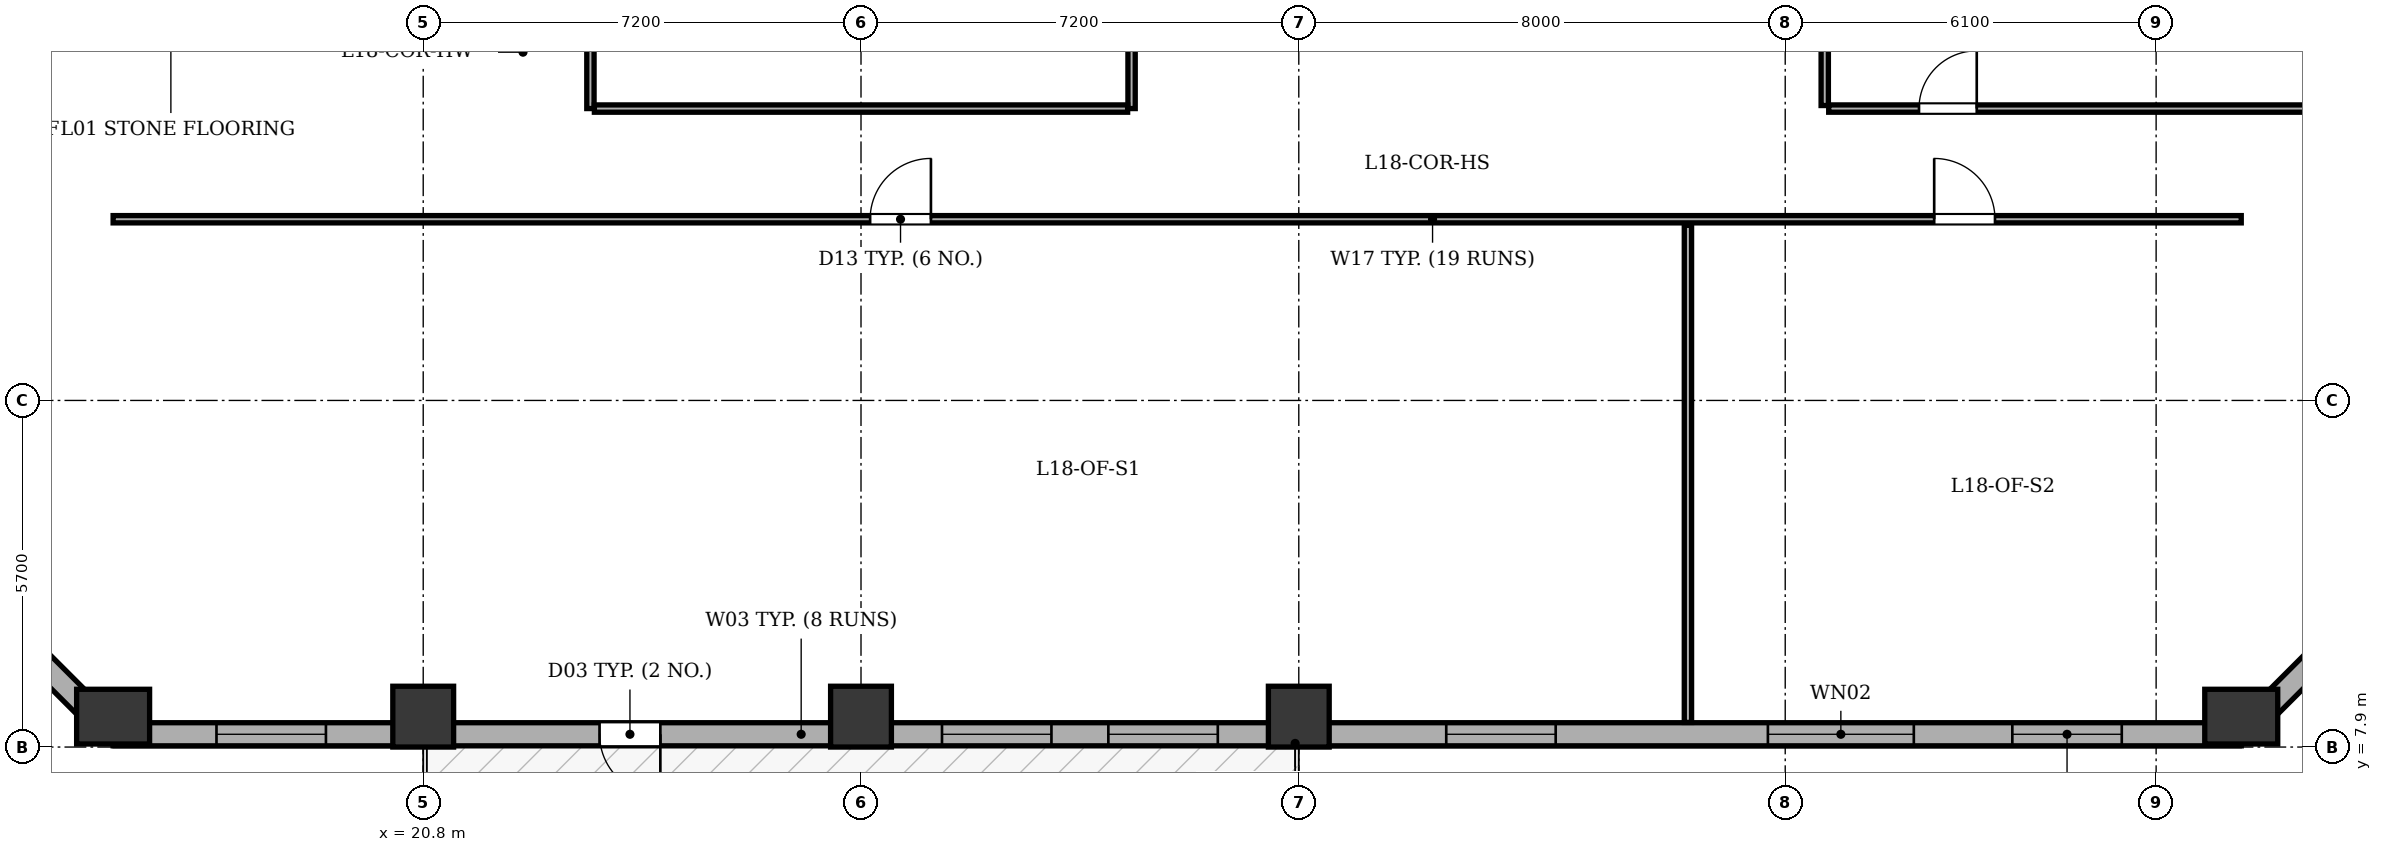
"""IFC4 building model, lengths in metres.
Left out: names, types, materials, properties, quantities, classifications, styles, units other than length and angle.
Written with IfcOpenShell. Run it as: python <this file> out.ifc"""

import sys

from ifc_helpers import new_model, si_unit, direction, frame, frame_2d, origin, origin_2d, place, context, subcontext, project, spatial, rectangle, extrude, element, fill, save


model = new_model("IFC4")
c1 = context("Model", 3, precision=1e-05, world=origin(), true_north=direction((0.0, 1.0)))
c2 = subcontext(c1, "Body", "Model", "MODEL_VIEW")
j1 = project(units=[si_unit("LENGTHUNIT", "METRE"), si_unit("PLANEANGLEUNIT", "RADIAN")], contexts=[c1])
p1 = place(None, origin())
s1 = spatial("IfcSite", under=j1, at=p1, CompositionType="ELEMENT")
p2 = place(p1, origin())
s2 = spatial("IfcBuilding", under=s1, at=p2, CompositionType="ELEMENT")
p3 = place(p2, frame((0.0, 0.0, 75.0)))
s3 = spatial("IfcBuildingStorey", under=s2, at=p3, CompositionType="ELEMENT", Elevation=75.0)
p4 = place(p3, frame((15.7, 8.4, 0.0), z_axis=(0.0, 0.0, 1.0), x_axis=(1.0, 0.0, 0.0)))
e1 = element("IfcColumn", 1, at=p4, inside=s3, PredefinedType="COLUMN", context=c2, shape_type="SweptSolid", body=[
    extrude(rectangle(XDim=0.9, YDim=1.2, at=origin_2d()), origin(), (0.0, 0.0, 1.0), 3.9),
])
for number, where, z_axis, x_axis in (
    (2, (20.8, 8.4, 0.0), (0.0, 0.0, 1.0), (1.0, 0.0, 0.0)),
    (3, (28.0, 8.4, 0.0), (0.0, 0.0, 1.0), (1.0, 0.0, 0.0)),
    (4, (35.2, 8.4, 0.0), (0.0, 0.0, 1.0), (1.0, 0.0, 0.0)),
):
    element("IfcColumn", number, at=place(p3, frame(where, z_axis=z_axis, x_axis=x_axis)), inside=s3, PredefinedType="COLUMN", context=c2, shape_type="SweptSolid", body=[
        extrude(rectangle(XDim=1.0, YDim=1.0, at=origin_2d()), origin(), (0.0, 0.0, 1.0), 3.9),
    ])
p5 = place(p3, frame((50.7, 8.4, 0.0), z_axis=(0.0, 0.0, 1.0), x_axis=(1.0, 0.0, 0.0)))
e5 = element("IfcColumn", 5, at=p5, inside=s3, PredefinedType="COLUMN", context=c2, shape_type="SweptSolid", body=[
    extrude(rectangle(XDim=0.9, YDim=1.2, at=origin_2d()), origin(), (0.0, 0.0, 1.0), 3.9),
])
p6 = place(p3, frame((50.7, 8.11, 0.0), z_axis=(0.0, 0.0, 1.0), x_axis=(-1.0, 0.0, 0.0)))
e6 = element("IfcWall", 6, at=p6, inside=s3, PredefinedType="STANDARD", context=c2, shape_type="SweptSolid", body=[
    extrude(rectangle(XDim=35.0, YDim=0.38, at=frame_2d((17.5, 0.0))), origin(), (0.0, 0.0, 1.0), 3.135),
])
p7 = place(p6, frame((26.0, 0.0, 0.0)))
e7 = element("IfcOpeningElement", 7, at=p7, cuts=e6, PredefinedType="OPENING", context=c2, shape_type="SweptSolid", body=[
    extrude(rectangle(XDim=1.0, YDim=2.02, at=frame_2d((0.5, 1.01))), frame((0.0, 0.2, 0.0), z_axis=(0.0, -1.0, 0.0), x_axis=(1.0, 0.0, 0.0)), (0.0, 0.0, 1.0), 0.4),
])
p8 = place(p6, frame((1.965, 0.0, 0.8)))
e8 = element("IfcOpeningElement", 8, at=p8, cuts=e6, PredefinedType="OPENING", context=c2, shape_type="SweptSolid", body=[
    extrude(rectangle(XDim=1.8, YDim=1.9, at=frame_2d((0.9, 0.95))), frame((0.0, 0.2, 0.0), z_axis=(0.0, -1.0, 0.0), x_axis=(1.0, 0.0, 0.0)), (0.0, 0.0, 1.0), 0.4),
])
p9 = place(p6, frame((5.385, 0.0, 0.8)))
e9 = element("IfcOpeningElement", 9, at=p9, cuts=e6, PredefinedType="OPENING", context=c2, shape_type="SweptSolid", body=[
    extrude(rectangle(XDim=2.4, YDim=1.9, at=frame_2d((1.2, 0.95))), frame((0.0, 0.2, 0.0), z_axis=(0.0, -1.0, 0.0), x_axis=(1.0, 0.0, 0.0)), (0.0, 0.0, 1.0), 0.4),
])
p10 = place(p6, frame((11.275, 0.0, 0.8)))
e10 = element("IfcOpeningElement", 10, at=p10, cuts=e6, PredefinedType="OPENING", context=c2, shape_type="SweptSolid", body=[
    extrude(rectangle(XDim=1.8, YDim=1.9, at=frame_2d((0.9, 0.95))), frame((0.0, 0.2, 0.0), z_axis=(0.0, -1.0, 0.0), x_axis=(1.0, 0.0, 0.0)), (0.0, 0.0, 1.0), 0.4),
])
p11 = place(p6, frame((16.832, 0.0, 0.8)))
e11 = element("IfcOpeningElement", 11, at=p11, cuts=e6, PredefinedType="OPENING", context=c2, shape_type="SweptSolid", body=[
    extrude(rectangle(XDim=1.8, YDim=1.9, at=frame_2d((0.9, 0.95))), frame((0.0, 0.2, 0.0), z_axis=(0.0, -1.0, 0.0), x_axis=(1.0, 0.0, 0.0)), (0.0, 0.0, 1.0), 0.4),
])
p12 = place(p6, frame((19.568, 0.0, 0.8)))
e12 = element("IfcOpeningElement", 12, at=p12, cuts=e6, PredefinedType="OPENING", context=c2, shape_type="SweptSolid", body=[
    extrude(rectangle(XDim=1.8, YDim=1.9, at=frame_2d((0.9, 0.95))), frame((0.0, 0.2, 0.0), z_axis=(0.0, -1.0, 0.0), x_axis=(1.0, 0.0, 0.0)), (0.0, 0.0, 1.0), 0.4),
])
p13 = place(p6, frame((31.5, 0.0, 0.8)))
e13 = element("IfcOpeningElement", 13, at=p13, cuts=e6, PredefinedType="OPENING", context=c2, shape_type="SweptSolid", body=[
    extrude(rectangle(XDim=1.8, YDim=1.9, at=frame_2d((0.9, 0.95))), frame((0.0, 0.2, 0.0), z_axis=(0.0, -1.0, 0.0), x_axis=(1.0, 0.0, 0.0)), (0.0, 0.0, 1.0), 0.4),
])
p14 = place(p3, frame((15.7, 8.11, 0.0), z_axis=(0.0, 0.0, 1.0), x_axis=(-0.707124801467, 0.707088760447, 0.0)))
e14 = element("IfcWall", 14, at=p14, inside=s3, PredefinedType="STANDARD", context=c2, shape_type="SweptSolid", body=[
    extrude(rectangle(XDim=6.774, YDim=0.38, at=frame_2d((3.387, 0.0))), origin(), (0.0, 0.0, 1.0), 3.135),
])
p15 = place(p14, frame((2.687, 0.0, 0.8)))
e15 = element("IfcOpeningElement", 15, at=p15, cuts=e14, PredefinedType="OPENING", context=c2, shape_type="SweptSolid", body=[
    extrude(rectangle(XDim=1.4, YDim=1.65, at=frame_2d((0.7, 0.825))), frame((0.0, 0.2, 0.0), z_axis=(0.0, -1.0, 0.0), x_axis=(1.0, 0.0, 0.0)), (0.0, 0.0, 1.0), 0.4),
])
p16 = place(p3, frame((55.49, 12.9, 0.0), z_axis=(0.0, 0.0, 1.0), x_axis=(-0.707124801467, -0.707088760447, 0.0)))
e16 = element("IfcWall", 16, at=p16, inside=s3, PredefinedType="STANDARD", context=c2, shape_type="SweptSolid", body=[
    extrude(rectangle(XDim=6.774, YDim=0.38, at=frame_2d((3.387, 0.0))), origin(), (0.0, 0.0, 1.0), 3.135),
])
p17 = place(p16, frame((2.687, 0.0, 0.8)))
e17 = element("IfcOpeningElement", 17, at=p17, cuts=e16, PredefinedType="OPENING", context=c2, shape_type="SweptSolid", body=[
    extrude(rectangle(XDim=1.4, YDim=1.65, at=frame_2d((0.7, 0.825))), frame((0.0, 0.2, 0.0), z_axis=(0.0, -1.0, 0.0), x_axis=(1.0, 0.0, 0.0)), (0.0, 0.0, 1.0), 0.4),
])
for number, where, z_axis, x_axis in (
    (18, (23.55, 18.4, 0.0), (0.0, 0.0, 1.0), (0.0, 1.0, 0.0)),
    (19, (32.45, 18.4, 0.0), (0.0, 0.0, 1.0), (0.0, 1.0, 0.0)),
):
    element("IfcWall", number, at=place(p3, frame(where, z_axis=z_axis, x_axis=x_axis)), inside=s3, PredefinedType="PARTITIONING", context=c2, shape_type="SweptSolid", body=[
        extrude(rectangle(XDim=3.485, YDim=0.12, at=frame_2d((1.743, 0.0))), origin(), (0.0, 0.0, 1.0), 3.6),
    ])
p18 = place(p3, frame((23.615, 18.4, 0.0), z_axis=(0.0, 0.0, 1.0), x_axis=(1.0, 0.0, 0.0)))
e20 = element("IfcWall", 20, at=p18, inside=s3, PredefinedType="PARTITIONING", context=c2, shape_type="SweptSolid", body=[
    extrude(rectangle(XDim=8.77, YDim=0.12, at=frame_2d((4.385, 0.0))), origin(), (0.0, 0.0, 1.0), 3.6),
])
p19 = place(p3, frame((15.7, 16.58, 0.0), z_axis=(0.0, 0.0, 1.0), x_axis=(1.0, 0.0, 0.0)))
e21 = element("IfcWall", 21, at=p19, inside=s3, PredefinedType="PARTITIONING", context=c2, shape_type="SweptSolid", body=[
    extrude(rectangle(XDim=35.0, YDim=0.12, at=frame_2d((17.5, 0.0))), origin(), (0.0, 0.0, 1.0), 3.6),
])
p20 = place(p19, frame((12.45, 0.0, 0.0)))
e22 = element("IfcOpeningElement", 22, at=p20, cuts=e21, PredefinedType="OPENING", context=c2, shape_type="SweptSolid", body=[
    extrude(rectangle(XDim=1.0, YDim=2.1, at=frame_2d((0.5, 1.05))), frame((0.0, 0.07, 0.0), z_axis=(0.0, -1.0, 0.0), x_axis=(1.0, 0.0, 0.0)), (0.0, 0.0, 1.0), 0.14),
])
p21 = place(p19, frame((29.95, 0.0, 0.0)))
e23 = element("IfcOpeningElement", 23, at=p21, cuts=e21, PredefinedType="OPENING", context=c2, shape_type="SweptSolid", body=[
    extrude(rectangle(XDim=1.0, YDim=2.1, at=frame_2d((0.5, 1.05))), frame((0.0, 0.07, 0.0), z_axis=(0.0, -1.0, 0.0), x_axis=(1.0, 0.0, 0.0)), (0.0, 0.0, 1.0), 0.14),
])
p22 = place(p3, frame((41.6, 8.305, 0.0), z_axis=(0.0, 0.0, 1.0), x_axis=(0.0, 1.0, 0.0)))
e24 = element("IfcWall", 24, at=p22, inside=s3, PredefinedType="PARTITIONING", context=c2, shape_type="SweptSolid", body=[
    extrude(rectangle(XDim=8.175, YDim=0.12, at=frame_2d((4.087, 0.0))), origin(), (0.0, 0.0, 1.0), 3.6),
])
p23 = place(p3, frame((43.85, 18.45, 0.0), z_axis=(0.0, 0.0, 1.0), x_axis=(0.0, 1.0, 0.0)))
e25 = element("IfcWall", 25, at=p23, inside=s3, PredefinedType="PARTITIONING", context=c2, shape_type="SweptSolid", body=[
    extrude(rectangle(XDim=17.5, YDim=0.12, at=frame_2d((8.75, 0.0))), origin(), (0.0, 0.0, 1.0), 3.6),
])
p24 = place(p3, frame((43.915, 18.4, 0.0), z_axis=(0.0, 0.0, 1.0), x_axis=(1.0, 0.0, 0.0)))
e26 = element("IfcWall", 26, at=p24, inside=s3, PredefinedType="PARTITIONING", context=c2, shape_type="SweptSolid", body=[
    extrude(rectangle(XDim=11.38, YDim=0.12, at=frame_2d((5.69, 0.0))), origin(), (0.0, 0.0, 1.0), 3.6),
])
p25 = place(p24, frame((1.485, 0.0, 0.0)))
e27 = element("IfcOpeningElement", 27, at=p25, cuts=e26, PredefinedType="OPENING", context=c2, shape_type="SweptSolid", body=[
    extrude(rectangle(XDim=0.95, YDim=2.1, at=frame_2d((0.475, 1.05))), frame((0.0, 0.07, 0.0), z_axis=(0.0, -1.0, 0.0), x_axis=(1.0, 0.0, 0.0)), (0.0, 0.0, 1.0), 0.14),
])
p26 = place(p7, origin())
e28 = element("IfcDoor", 28, at=p26, inside=s3, OperationType="SINGLE_SWING_LEFT", PredefinedType="DOOR", context=c2, shape_type="SweptSolid", body=[
    extrude(rectangle(XDim=1.0, YDim=2.02, at=frame_2d((0.5, 1.01))), frame((0.0, 0.025, 0.0), z_axis=(0.0, -1.0, 0.0), x_axis=(1.0, 0.0, 0.0)), (0.0, 0.0, 1.0), 0.05),
])
fill(e7, e28)
p27 = place(p8, origin())
e29 = element("IfcWindow", 29, at=p27, inside=s3, PartitioningType="SINGLE_PANEL", PredefinedType="WINDOW", context=c2, shape_type="SweptSolid", body=[
    extrude(rectangle(XDim=1.8, YDim=1.9, at=frame_2d((0.9, 0.95))), frame((0.0, -0.01, 0.0), z_axis=(0.0, -1.0, 0.0), x_axis=(1.0, 0.0, 0.0)), (0.0, 0.0, 1.0), 0.06),
])
fill(e8, e29)
p28 = place(p9, origin())
e30 = element("IfcWindow", 30, at=p28, inside=s3, PartitioningType="SINGLE_PANEL", PredefinedType="WINDOW", context=c2, shape_type="SweptSolid", body=[
    extrude(rectangle(XDim=2.4, YDim=1.9, at=frame_2d((1.2, 0.95))), frame((0.0, -0.01, 0.0), z_axis=(0.0, -1.0, 0.0), x_axis=(1.0, 0.0, 0.0)), (0.0, 0.0, 1.0), 0.06),
])
fill(e9, e30)
p29 = place(p10, origin())
e31 = element("IfcWindow", 31, at=p29, inside=s3, PartitioningType="SINGLE_PANEL", PredefinedType="WINDOW", context=c2, shape_type="SweptSolid", body=[
    extrude(rectangle(XDim=1.8, YDim=1.9, at=frame_2d((0.9, 0.95))), frame((0.0, -0.01, 0.0), z_axis=(0.0, -1.0, 0.0), x_axis=(1.0, 0.0, 0.0)), (0.0, 0.0, 1.0), 0.06),
])
fill(e10, e31)
p30 = place(p11, origin())
e32 = element("IfcWindow", 32, at=p30, inside=s3, PartitioningType="SINGLE_PANEL", PredefinedType="WINDOW", context=c2, shape_type="SweptSolid", body=[
    extrude(rectangle(XDim=1.8, YDim=1.9, at=frame_2d((0.9, 0.95))), frame((0.0, -0.01, 0.0), z_axis=(0.0, -1.0, 0.0), x_axis=(1.0, 0.0, 0.0)), (0.0, 0.0, 1.0), 0.06),
])
fill(e11, e32)
p31 = place(p12, origin())
e33 = element("IfcWindow", 33, at=p31, inside=s3, PartitioningType="SINGLE_PANEL", PredefinedType="WINDOW", context=c2, shape_type="SweptSolid", body=[
    extrude(rectangle(XDim=1.8, YDim=1.9, at=frame_2d((0.9, 0.95))), frame((0.0, -0.01, 0.0), z_axis=(0.0, -1.0, 0.0), x_axis=(1.0, 0.0, 0.0)), (0.0, 0.0, 1.0), 0.06),
])
fill(e12, e33)
p32 = place(p13, origin())
e34 = element("IfcWindow", 34, at=p32, inside=s3, PartitioningType="SINGLE_PANEL", PredefinedType="WINDOW", context=c2, shape_type="SweptSolid", body=[
    extrude(rectangle(XDim=1.8, YDim=1.9, at=frame_2d((0.9, 0.95))), frame((0.0, -0.01, 0.0), z_axis=(0.0, -1.0, 0.0), x_axis=(1.0, 0.0, 0.0)), (0.0, 0.0, 1.0), 0.06),
])
fill(e13, e34)
p33 = place(p20, origin())
e35 = element("IfcDoor", 35, at=p33, inside=s3, OperationType="SINGLE_SWING_RIGHT", PredefinedType="DOOR", context=c2, shape_type="SweptSolid", body=[
    extrude(rectangle(XDim=1.0, YDim=2.1, at=frame_2d((0.5, 1.05))), frame((0.0, 0.025, 0.0), z_axis=(0.0, -1.0, 0.0), x_axis=(1.0, 0.0, 0.0)), (0.0, 0.0, 1.0), 0.05),
])
fill(e22, e35)
p34 = place(p21, origin())
e36 = element("IfcDoor", 36, at=p34, inside=s3, OperationType="SINGLE_SWING_LEFT", PredefinedType="DOOR", context=c2, shape_type="SweptSolid", body=[
    extrude(rectangle(XDim=1.0, YDim=2.1, at=frame_2d((0.5, 1.05))), frame((0.0, 0.025, 0.0), z_axis=(0.0, -1.0, 0.0), x_axis=(1.0, 0.0, 0.0)), (0.0, 0.0, 1.0), 0.05),
])
fill(e23, e36)
p35 = place(p25, origin())
e37 = element("IfcDoor", 37, at=p35, inside=s3, OperationType="SINGLE_SWING_RIGHT", PredefinedType="DOOR", context=c2, shape_type="SweptSolid", body=[
    extrude(rectangle(XDim=0.95, YDim=2.1, at=frame_2d((0.475, 1.05))), frame((0.0, 0.025, 0.0), z_axis=(0.0, -1.0, 0.0), x_axis=(1.0, 0.0, 0.0)), (0.0, 0.0, 1.0), 0.05),
])
fill(e27, e37)
save(model, sys.argv[1])
